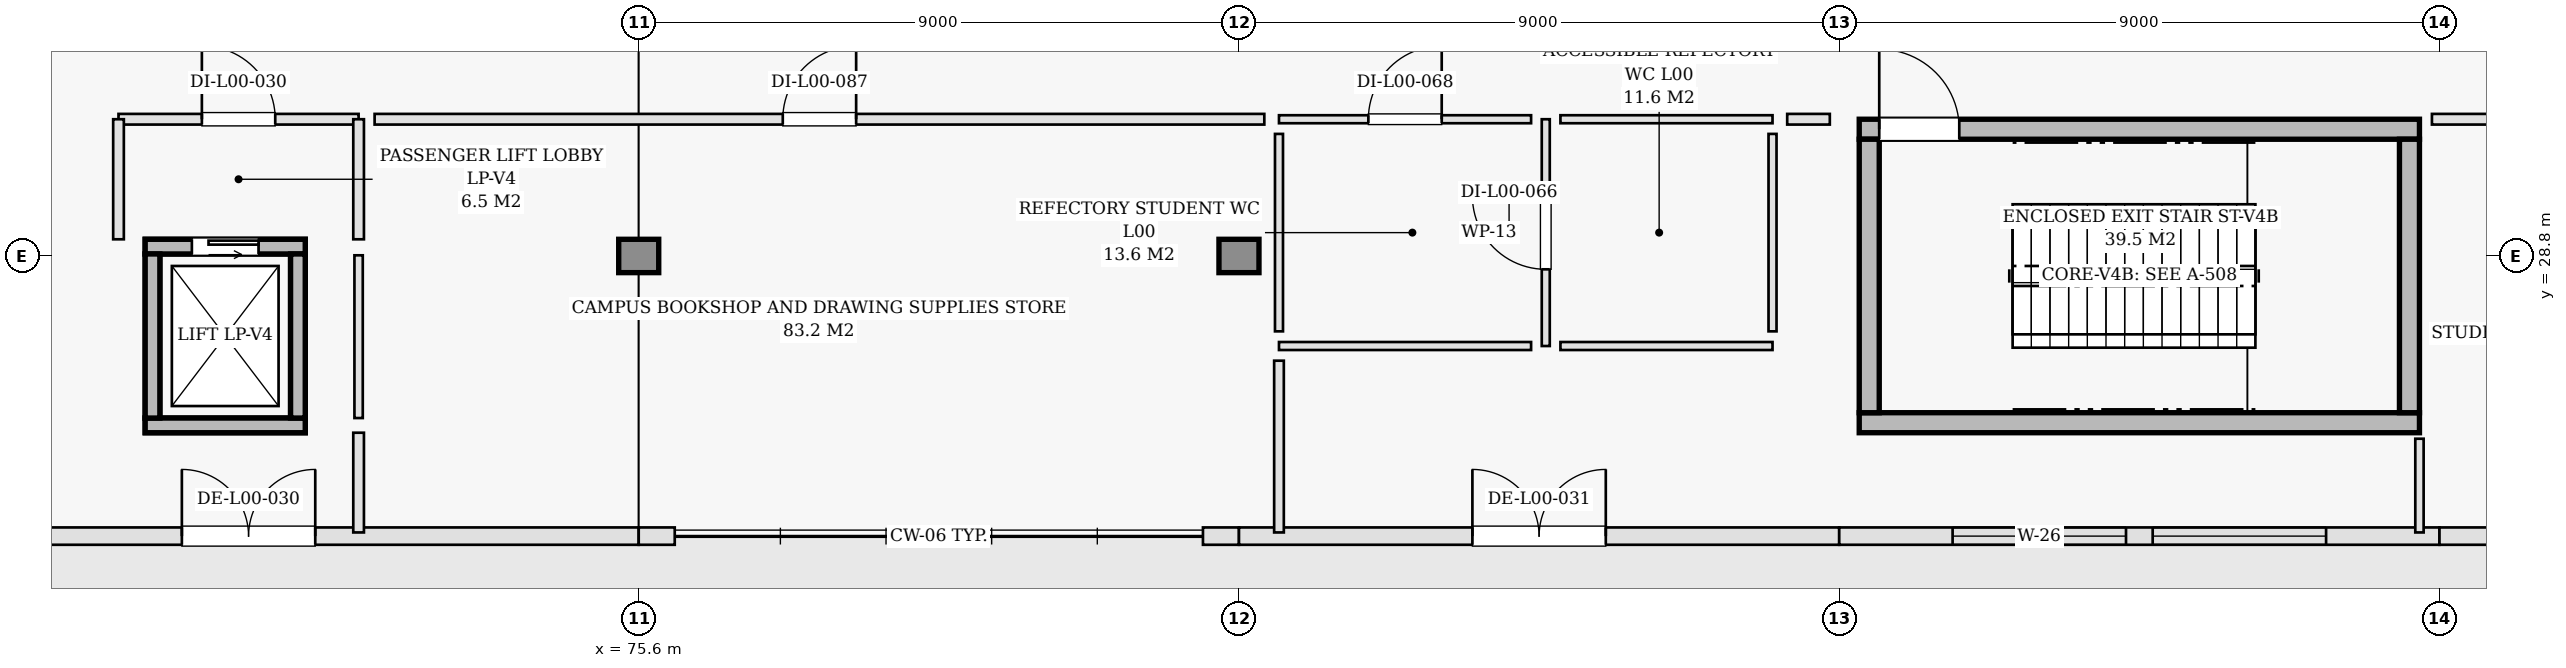
"""IFC4 building model, lengths in metres.
Left out: names, types, materials, properties, quantities, classifications, styles, units other than length and angle.
Written with IfcOpenShell. Run it as: python <this file> out.ifc"""

import sys

from ifc_helpers import new_model, si_unit, direction, frame, frame_2d, origin, origin_2d, place, context, subcontext, project, spatial, rectangle, extrude, element, fill, save


model = new_model("IFC4")
c1 = context("Model", 3, precision=1e-05, world=origin(), true_north=direction((0.0, 1.0)))
c2 = subcontext(c1, "Body", "Model", "MODEL_VIEW")
j1 = project(units=[si_unit("LENGTHUNIT", "METRE"), si_unit("PLANEANGLEUNIT", "RADIAN")], contexts=[c1])
p1 = place(None, origin())
s1 = spatial("IfcSite", under=j1, at=p1, CompositionType="ELEMENT")
p2 = place(p1, origin())
s2 = spatial("IfcBuilding", under=s1, at=p2, CompositionType="ELEMENT")
p3 = place(p2, origin())
s3 = spatial("IfcBuildingStorey", under=s2, at=p3, CompositionType="ELEMENT", Elevation=0.0)
for number, where, z_axis, x_axis in (
    (1, (75.6, 28.8, 0.0), (0.0, 0.0, 1.0), (1.0, 0.0, 0.0)),
    (2, (84.6, 28.8, 0.0), (0.0, 0.0, 1.0), (1.0, 0.0, 0.0)),
):
    element("IfcColumn", number, at=place(p3, frame(where, z_axis=z_axis, x_axis=x_axis)), inside=s3, PredefinedType="COLUMN", context=c2, shape_type="SweptSolid", body=[
        extrude(rectangle(XDim=0.5, YDim=0.5, at=origin_2d()), origin(), (0.0, 0.0, 1.0), 4.8),
    ])
p4 = place(p3, frame((66.6, 24.6, 0.0), z_axis=(0.0, 0.0, 1.0), x_axis=(1.0, 0.0, 0.0)))
e3 = element("IfcWall", 3, at=p4, inside=s3, PredefinedType="SOLIDWALL", context=c2, shape_type="SweptSolid", body=[
    extrude(rectangle(XDim=9.0, YDim=0.26, at=frame_2d((4.5, 0.0))), origin(), (0.0, 0.0, 1.0), 3.605),
])
p5 = place(p4, frame((2.15, 0.0, 0.0)))
e4 = element("IfcOpeningElement", 4, at=p5, cuts=e3, PredefinedType="OPENING", context=c2, shape_type="SweptSolid", body=[
    extrude(rectangle(XDim=2.0, YDim=2.3, at=frame_2d((1.0, 1.15))), frame((0.0, 0.14, 0.0), z_axis=(0.0, -1.0, 0.0), x_axis=(1.0, 0.0, 0.0)), (0.0, 0.0, 1.0), 0.28),
])
p6 = place(p3, frame((75.6, 24.6, 0.0), z_axis=(0.0, 0.0, 1.0), x_axis=(1.0, 0.0, 0.0)))
e5 = element("IfcWall", 5, at=p6, inside=s3, PredefinedType="SOLIDWALL", context=c2, shape_type="SweptSolid", body=[
    extrude(rectangle(XDim=0.54, YDim=0.26, at=frame_2d((0.27, 0.0))), origin(), (0.0, 0.0, 1.0), 3.955),
])
p7 = place(p3, frame((84.06, 24.6, 0.0), z_axis=(0.0, 0.0, 1.0), x_axis=(1.0, 0.0, 0.0)))
e6 = element("IfcWall", 6, at=p7, inside=s3, PredefinedType="SOLIDWALL", context=c2, shape_type="SweptSolid", body=[
    extrude(rectangle(XDim=0.54, YDim=0.26, at=frame_2d((0.27, 0.0))), origin(), (0.0, 0.0, 1.0), 3.955),
])
p8 = place(p3, frame((84.6, 24.6, 0.0), z_axis=(0.0, 0.0, 1.0), x_axis=(1.0, 0.0, 0.0)))
e7 = element("IfcWall", 7, at=p8, inside=s3, PredefinedType="SOLIDWALL", context=c2, shape_type="SweptSolid", body=[
    extrude(rectangle(XDim=9.0, YDim=0.26, at=frame_2d((4.5, 0.0))), origin(), (0.0, 0.0, 1.0), 3.605),
])
p9 = place(p8, frame((3.5, 0.0, 0.0)))
e8 = element("IfcOpeningElement", 8, at=p9, cuts=e7, PredefinedType="OPENING", context=c2, shape_type="SweptSolid", body=[
    extrude(rectangle(XDim=2.0, YDim=2.3, at=frame_2d((1.0, 1.15))), frame((0.0, 0.14, 0.0), z_axis=(0.0, -1.0, 0.0), x_axis=(1.0, 0.0, 0.0)), (0.0, 0.0, 1.0), 0.28),
])
p10 = place(p3, frame((93.6, 24.6, 0.0), z_axis=(0.0, 0.0, 1.0), x_axis=(1.0, 0.0, 0.0)))
e9 = element("IfcWall", 9, at=p10, inside=s3, PredefinedType="SOLIDWALL", context=c2, shape_type="SweptSolid", body=[
    extrude(rectangle(XDim=9.0, YDim=0.26, at=frame_2d((4.5, 0.0))), origin(), (0.0, 0.0, 1.0), 3.605),
])
p11 = place(p10, frame((1.7, 0.0, 0.9)))
e10 = element("IfcOpeningElement", 10, at=p11, cuts=e9, PredefinedType="OPENING", context=c2, shape_type="SweptSolid", body=[
    extrude(rectangle(XDim=2.6, YDim=1.95, at=frame_2d((1.3, 0.975))), frame((0.0, 0.14, 0.0), z_axis=(0.0, -1.0, 0.0), x_axis=(1.0, 0.0, 0.0)), (0.0, 0.0, 1.0), 0.28),
])
p12 = place(p10, frame((4.7, 0.0, 0.9)))
e11 = element("IfcOpeningElement", 11, at=p12, cuts=e9, PredefinedType="OPENING", context=c2, shape_type="SweptSolid", body=[
    extrude(rectangle(XDim=2.6, YDim=1.95, at=frame_2d((1.3, 0.975))), frame((0.0, 0.14, 0.0), z_axis=(0.0, -1.0, 0.0), x_axis=(1.0, 0.0, 0.0)), (0.0, 0.0, 1.0), 0.28),
])
p13 = place(p3, frame((102.6, 24.6, 0.0), z_axis=(0.0, 0.0, 1.0), x_axis=(1.0, 0.0, 0.0)))
e12 = element("IfcWall", 12, at=p13, inside=s3, PredefinedType="SOLIDWALL", context=c2, shape_type="SweptSolid", body=[
    extrude(rectangle(XDim=8.75, YDim=0.26, at=frame_2d((4.375, 0.0))), origin(), (0.0, 0.0, 1.0), 3.605),
])
p14 = place(p13, frame((3.375, 0.0, 0.0)))
e13 = element("IfcOpeningElement", 13, at=p14, cuts=e12, PredefinedType="OPENING", context=c2, shape_type="SweptSolid", body=[
    extrude(rectangle(XDim=2.0, YDim=2.3, at=frame_2d((1.0, 1.15))), frame((0.0, 0.14, 0.0), z_axis=(0.0, -1.0, 0.0), x_axis=(1.0, 0.0, 0.0)), (0.0, 0.0, 1.0), 0.28),
])
p15 = place(p3, frame((93.9, 26.3, 0.0), z_axis=(0.0, 0.0, 1.0), x_axis=(1.0, 0.0, 0.0)))
e14 = element("IfcWall", 14, at=p15, inside=s3, PredefinedType="SHEAR", context=c2, shape_type="SweptSolid", body=[
    extrude(rectangle(XDim=8.4, YDim=0.3, at=frame_2d((4.2, 0.0))), origin(), (0.0, 0.0, 1.0), 4.52),
])
p16 = place(p3, frame((93.9, 30.7, 0.0), z_axis=(0.0, 0.0, 1.0), x_axis=(1.0, 0.0, 0.0)))
e15 = element("IfcWall", 15, at=p16, inside=s3, PredefinedType="SHEAR", context=c2, shape_type="SweptSolid", body=[
    extrude(rectangle(XDim=8.4, YDim=0.3, at=frame_2d((4.2, 0.0))), origin(), (0.0, 0.0, 1.0), 4.52),
])
p17 = place(p16, frame((0.3, 0.0, 0.0)))
e16 = element("IfcOpeningElement", 16, at=p17, cuts=e15, PredefinedType="OPENING", context=c2, shape_type="SweptSolid", body=[
    extrude(rectangle(XDim=1.2, YDim=2.15, at=frame_2d((0.6, 1.075))), frame((0.0, 0.16, 0.0), z_axis=(0.0, -1.0, 0.0), x_axis=(1.0, 0.0, 0.0)), (0.0, 0.0, 1.0), 0.32),
])
for number, where, z_axis, x_axis in (
    (17, (94.05, 26.45, 0.0), (0.0, 0.0, 1.0), (0.0, 1.0, 0.0)),
    (18, (102.15, 26.45, 0.0), (0.0, 0.0, 1.0), (0.0, 1.0, 0.0)),
):
    element("IfcWall", number, at=place(p3, frame(where, z_axis=z_axis, x_axis=x_axis)), inside=s3, PredefinedType="SHEAR", context=c2, shape_type="SweptSolid", body=[
        extrude(rectangle(XDim=4.1, YDim=0.3, at=frame_2d((2.05, 0.0))), origin(), (0.0, 0.0, 1.0), 4.52),
    ])
for number, where, z_axis, x_axis in (
    (19, (68.2, 26.26, -1.4), (0.0, 0.0, 1.0), (1.0, 0.0, 0.0)),
    (20, (68.2, 28.94, -1.4), (0.0, 0.0, 1.0), (1.0, 0.0, 0.0)),
):
    element("IfcWall", number, at=place(p3, frame(where, z_axis=z_axis, x_axis=x_axis)), inside=s3, PredefinedType="SHEAR", context=c2, shape_type="SweptSolid", body=[
        extrude(rectangle(XDim=2.4, YDim=0.22, at=frame_2d((1.2, 0.0))), origin(), (0.0, 0.0, 1.0), 1.05),
    ])
for number, where, z_axis, x_axis in (
    (21, (68.31, 26.37, -1.4), (0.0, 0.0, 1.0), (0.0, 1.0, 0.0)),
    (22, (70.49, 26.37, -1.4), (0.0, 0.0, 1.0), (0.0, 1.0, 0.0)),
):
    element("IfcWall", number, at=place(p3, frame(where, z_axis=z_axis, x_axis=x_axis)), inside=s3, PredefinedType="SHEAR", context=c2, shape_type="SweptSolid", body=[
        extrude(rectangle(XDim=2.46, YDim=0.22, at=frame_2d((1.23, 0.0))), origin(), (0.0, 0.0, 1.0), 1.05),
    ])
p18 = place(p3, frame((68.2, 26.26, 0.0), z_axis=(0.0, 0.0, 1.0), x_axis=(1.0, 0.0, 0.0)))
e23 = element("IfcWall", 23, at=p18, inside=s3, PredefinedType="SHEAR", context=c2, shape_type="SweptSolid", body=[
    extrude(rectangle(XDim=2.4, YDim=0.22, at=frame_2d((1.2, 0.0))), origin(), (0.0, 0.0, 1.0), 4.52),
])
p19 = place(p3, frame((68.2, 28.94, 0.0), z_axis=(0.0, 0.0, 1.0), x_axis=(1.0, 0.0, 0.0)))
e24 = element("IfcWall", 24, at=p19, inside=s3, PredefinedType="SHEAR", context=c2, shape_type="SweptSolid", body=[
    extrude(rectangle(XDim=2.4, YDim=0.22, at=frame_2d((1.2, 0.0))), origin(), (0.0, 0.0, 1.0), 4.52),
])
p20 = place(p19, frame((0.7, 0.0, 0.0)))
e25 = element("IfcOpeningElement", 25, at=p20, cuts=e24, PredefinedType="OPENING", context=c2, shape_type="SweptSolid", body=[
    extrude(rectangle(XDim=1.0, YDim=2.15, at=frame_2d((0.5, 1.075))), frame((0.0, 0.12, 0.0), z_axis=(0.0, -1.0, 0.0), x_axis=(1.0, 0.0, 0.0)), (0.0, 0.0, 1.0), 0.24),
])
for number, where, z_axis, x_axis in (
    (26, (68.31, 26.37, 0.0), (0.0, 0.0, 1.0), (0.0, 1.0, 0.0)),
    (27, (70.49, 26.37, 0.0), (0.0, 0.0, 1.0), (0.0, 1.0, 0.0)),
):
    element("IfcWall", number, at=place(p3, frame(where, z_axis=z_axis, x_axis=x_axis)), inside=s3, PredefinedType="SHEAR", context=c2, shape_type="SweptSolid", body=[
        extrude(rectangle(XDim=2.46, YDim=0.22, at=frame_2d((1.23, 0.0))), origin(), (0.0, 0.0, 1.0), 4.52),
    ])
p21 = place(p3, frame((67.8, 30.85, 0.0), z_axis=(0.0, 0.0, 1.0), x_axis=(1.0, 0.0, 0.0)))
e28 = element("IfcWall", 28, at=p21, inside=s3, PredefinedType="PARTITIONING", context=c2, shape_type="SweptSolid", body=[
    extrude(rectangle(XDim=3.6, YDim=0.16, at=frame_2d((1.8, 0.0))), origin(), (0.0, 0.0, 1.0), 4.52),
])
p22 = place(p21, frame((1.25, 0.0, 0.0)))
e29 = element("IfcOpeningElement", 29, at=p22, cuts=e28, PredefinedType="OPENING", context=c2, shape_type="SweptSolid", body=[
    extrude(rectangle(XDim=1.1, YDim=2.15, at=frame_2d((0.55, 1.075))), frame((0.0, 0.09, 0.0), z_axis=(0.0, -1.0, 0.0), x_axis=(1.0, 0.0, 0.0)), (0.0, 0.0, 1.0), 0.18),
])
for number, where, z_axis, x_axis in (
    (30, (67.8, 29.05, 0.0), (0.0, 0.0, 1.0), (0.0, 1.0, 0.0)),
    (31, (71.4, 29.05, 0.0), (0.0, 0.0, 1.0), (0.0, 1.0, 0.0)),
):
    element("IfcWall", number, at=place(p3, frame(where, z_axis=z_axis, x_axis=x_axis)), inside=s3, PredefinedType="PARTITIONING", context=c2, shape_type="SweptSolid", body=[
        extrude(rectangle(XDim=1.8, YDim=0.16, at=frame_2d((0.9, 0.0))), origin(), (0.0, 0.0, 1.0), 4.52),
    ])
p23 = place(p3, frame((89.2, 27.45, 0.0), z_axis=(0.0, 0.0, 1.0), x_axis=(0.0, 1.0, 0.0)))
e32 = element("IfcWall", 32, at=p23, inside=s3, PredefinedType="PARTITIONING", context=c2, shape_type="SweptSolid", body=[
    extrude(rectangle(XDim=3.4, YDim=0.12, at=frame_2d((1.7, 0.0))), origin(), (0.0, 0.0, 1.0), 4.52),
])
p24 = place(p23, frame((1.15, 0.0, 0.0)))
e33 = element("IfcOpeningElement", 33, at=p24, cuts=e32, PredefinedType="OPENING", context=c2, shape_type="SweptSolid", body=[
    extrude(rectangle(XDim=1.1, YDim=2.15, at=frame_2d((0.55, 1.075))), frame((0.0, 0.07, 0.0), z_axis=(0.0, -1.0, 0.0), x_axis=(1.0, 0.0, 0.0)), (0.0, 0.0, 1.0), 0.14),
])
for number, where, z_axis, x_axis in (
    (34, (89.42, 27.45, 0.0), (0.0, 0.0, 1.0), (1.0, 0.0, 0.0)),
    (35, (89.42, 30.85, 0.0), (0.0, 0.0, 1.0), (1.0, 0.0, 0.0)),
):
    element("IfcWall", number, at=place(p3, frame(where, z_axis=z_axis, x_axis=x_axis)), inside=s3, PredefinedType="PARTITIONING", context=c2, shape_type="SweptSolid", body=[
        extrude(rectangle(XDim=3.18, YDim=0.12, at=frame_2d((1.59, 0.0))), origin(), (0.0, 0.0, 1.0), 4.52),
    ])
p25 = place(p3, frame((92.6, 27.67, 0.0), z_axis=(0.0, 0.0, 1.0), x_axis=(0.0, 1.0, 0.0)))
e36 = element("IfcWall", 36, at=p25, inside=s3, PredefinedType="PARTITIONING", context=c2, shape_type="SweptSolid", body=[
    extrude(rectangle(XDim=2.96, YDim=0.12, at=frame_2d((1.48, 0.0))), origin(), (0.0, 0.0, 1.0), 4.52),
])
p26 = place(p3, frame((85.2, 30.85, 0.0), z_axis=(0.0, 0.0, 1.0), x_axis=(1.0, 0.0, 0.0)))
e37 = element("IfcWall", 37, at=p26, inside=s3, PredefinedType="PARTITIONING", context=c2, shape_type="SweptSolid", body=[
    extrude(rectangle(XDim=3.78, YDim=0.12, at=frame_2d((1.89, 0.0))), origin(), (0.0, 0.0, 1.0), 4.52),
])
p27 = place(p26, frame((1.34, 0.0, 0.0)))
e38 = element("IfcOpeningElement", 38, at=p27, cuts=e37, PredefinedType="OPENING", context=c2, shape_type="SweptSolid", body=[
    extrude(rectangle(XDim=1.1, YDim=2.15, at=frame_2d((0.55, 1.075))), frame((0.0, 0.07, 0.0), z_axis=(0.0, -1.0, 0.0), x_axis=(1.0, 0.0, 0.0)), (0.0, 0.0, 1.0), 0.14),
])
p28 = place(p3, frame((85.2, 27.45, 0.0), z_axis=(0.0, 0.0, 1.0), x_axis=(1.0, 0.0, 0.0)))
e39 = element("IfcWall", 39, at=p28, inside=s3, PredefinedType="PARTITIONING", context=c2, shape_type="SweptSolid", body=[
    extrude(rectangle(XDim=3.78, YDim=0.12, at=frame_2d((1.89, 0.0))), origin(), (0.0, 0.0, 1.0), 4.52),
])
p29 = place(p3, frame((85.2, 27.67, 0.0), z_axis=(0.0, 0.0, 1.0), x_axis=(0.0, 1.0, 0.0)))
e40 = element("IfcWall", 40, at=p29, inside=s3, PredefinedType="PARTITIONING", context=c2, shape_type="SweptSolid", body=[
    extrude(rectangle(XDim=2.96, YDim=0.12, at=frame_2d((1.48, 0.0))), origin(), (0.0, 0.0, 1.0), 4.52),
])
p30 = place(p3, frame((102.487, 30.85, 0.0), z_axis=(0.0, 0.0, 1.0), x_axis=(1.0, 0.0, 0.0)))
e41 = element("IfcWall", 41, at=p30, inside=s3, PredefinedType="PARTITIONING", context=c2, shape_type="SweptSolid", body=[
    extrude(rectangle(XDim=2.967, YDim=0.16, at=frame_2d((1.483, 0.0))), origin(), (0.0, 0.0, 1.0), 3.605),
])
p31 = place(p3, frame((102.3, 24.655, 0.0), z_axis=(0.0, 0.0, 1.0), x_axis=(0.0, 1.0, 0.0)))
e42 = element("IfcWall", 42, at=p31, inside=s3, PredefinedType="PARTITIONING", context=c2, shape_type="SweptSolid", body=[
    extrude(rectangle(XDim=1.405, YDim=0.125, at=frame_2d((0.703, 0.0))), origin(), (0.0, 0.0, 1.0), 3.605),
])
p32 = place(p3, frame((71.64, 30.85, 0.0), z_axis=(0.0, 0.0, 1.0), x_axis=(1.0, 0.0, 0.0)))
e43 = element("IfcWall", 43, at=p32, inside=s3, PredefinedType="PARTITIONING", context=c2, shape_type="SweptSolid", body=[
    extrude(rectangle(XDim=13.34, YDim=0.16, at=frame_2d((6.67, 0.0))), origin(), (0.0, 0.0, 1.0), 3.605),
])
p33 = place(p32, frame((6.12, 0.0, 0.0)))
e44 = element("IfcOpeningElement", 44, at=p33, cuts=e43, PredefinedType="OPENING", context=c2, shape_type="SweptSolid", body=[
    extrude(rectangle(XDim=1.1, YDim=2.15, at=frame_2d((0.55, 1.075))), frame((0.0, 0.09, 0.0), z_axis=(0.0, -1.0, 0.0), x_axis=(1.0, 0.0, 0.0)), (0.0, 0.0, 1.0), 0.18),
])
p34 = place(p3, frame((71.4, 24.655, 0.0), z_axis=(0.0, 0.0, 1.0), x_axis=(0.0, 1.0, 0.0)))
e45 = element("IfcWall", 45, at=p34, inside=s3, PredefinedType="PARTITIONING", context=c2, shape_type="SweptSolid", body=[
    extrude(rectangle(XDim=1.495, YDim=0.16, at=frame_2d((0.748, 0.0))), origin(), (0.0, 0.0, 1.0), 4.52),
])
p35 = place(p3, frame((71.4, 26.37, 0.0), z_axis=(0.0, 0.0, 1.0), x_axis=(0.0, 1.0, 0.0)))
e46 = element("IfcWall", 46, at=p35, inside=s3, PredefinedType="PARTITIONING", context=c2, shape_type="SweptSolid", body=[
    extrude(rectangle(XDim=2.44, YDim=0.125, at=frame_2d((1.22, 0.0))), origin(), (0.0, 0.0, 1.0), 4.52),
])
p36 = place(p3, frame((85.2, 24.655, 0.0), z_axis=(0.0, 0.0, 1.0), x_axis=(0.0, 1.0, 0.0)))
e47 = element("IfcWall", 47, at=p36, inside=s3, PredefinedType="PARTITIONING", context=c2, shape_type="SweptSolid", body=[
    extrude(rectangle(XDim=2.575, YDim=0.145, at=frame_2d((1.288, 0.0))), origin(), (0.0, 0.0, 1.0), 4.145),
])
p37 = place(p3, frame((92.82, 30.85, 0.0), z_axis=(0.0, 0.0, 1.0), x_axis=(1.0, 0.0, 0.0)))
e48 = element("IfcWall", 48, at=p37, inside=s3, PredefinedType="PARTITIONING", context=c2, shape_type="SweptSolid", body=[
    extrude(rectangle(XDim=0.639, YDim=0.16, at=frame_2d((0.319, 0.0))), origin(), (0.0, 0.0, 1.0), 3.605),
])
p38 = place(p5, origin())
e49 = element("IfcDoor", 49, at=p38, inside=s3, OperationType="DOUBLE_DOOR_SINGLE_SWING", PredefinedType="DOOR", context=c2, shape_type="SweptSolid", body=[
    extrude(rectangle(XDim=2.0, YDim=2.3, at=frame_2d((1.0, 1.15))), frame((0.0, 0.025, 0.0), z_axis=(0.0, -1.0, 0.0), x_axis=(1.0, 0.0, 0.0)), (0.0, 0.0, 1.0), 0.05),
])
fill(e4, e49)
p39 = place(p9, origin())
e50 = element("IfcDoor", 50, at=p39, inside=s3, OperationType="DOUBLE_DOOR_SINGLE_SWING", PredefinedType="DOOR", context=c2, shape_type="SweptSolid", body=[
    extrude(rectangle(XDim=2.0, YDim=2.3, at=frame_2d((1.0, 1.15))), frame((0.0, 0.025, 0.0), z_axis=(0.0, -1.0, 0.0), x_axis=(1.0, 0.0, 0.0)), (0.0, 0.0, 1.0), 0.05),
])
fill(e8, e50)
p40 = place(p11, origin())
e51 = element("IfcWindow", 51, at=p40, inside=s3, PartitioningType="DOUBLE_PANEL_VERTICAL", PredefinedType="WINDOW", context=c2, shape_type="SweptSolid", body=[
    extrude(rectangle(XDim=2.6, YDim=1.95, at=frame_2d((1.3, 0.975))), frame((0.0, 0.03, 0.0), z_axis=(0.0, -1.0, 0.0), x_axis=(1.0, 0.0, 0.0)), (0.0, 0.0, 1.0), 0.06),
])
fill(e10, e51)
p41 = place(p12, origin())
e52 = element("IfcWindow", 52, at=p41, inside=s3, PartitioningType="DOUBLE_PANEL_VERTICAL", PredefinedType="WINDOW", context=c2, shape_type="SweptSolid", body=[
    extrude(rectangle(XDim=2.6, YDim=1.95, at=frame_2d((1.3, 0.975))), frame((0.0, 0.03, 0.0), z_axis=(0.0, -1.0, 0.0), x_axis=(1.0, 0.0, 0.0)), (0.0, 0.0, 1.0), 0.06),
])
fill(e11, e52)
p42 = place(p17, origin())
e53 = element("IfcDoor", 53, at=p42, inside=s3, OperationType="SINGLE_SWING_LEFT", PredefinedType="DOOR", context=c2, shape_type="SweptSolid", body=[
    extrude(rectangle(XDim=1.2, YDim=2.15, at=frame_2d((0.6, 1.075))), frame((0.0, 0.025, 0.0), z_axis=(0.0, -1.0, 0.0), x_axis=(1.0, 0.0, 0.0)), (0.0, 0.0, 1.0), 0.05),
])
fill(e16, e53)
p43 = place(p20, origin())
e54 = element("IfcDoor", 54, at=p43, inside=s3, OperationType="SLIDING_TO_RIGHT", PredefinedType="DOOR", context=c2, shape_type="SweptSolid", body=[
    extrude(rectangle(XDim=1.0, YDim=2.15, at=frame_2d((0.5, 1.075))), frame((0.0, 0.025, 0.0), z_axis=(0.0, -1.0, 0.0), x_axis=(1.0, 0.0, 0.0)), (0.0, 0.0, 1.0), 0.05),
])
fill(e25, e54)
p44 = place(p22, origin())
e55 = element("IfcDoor", 55, at=p44, inside=s3, OperationType="SINGLE_SWING_LEFT", PredefinedType="DOOR", context=c2, shape_type="SweptSolid", body=[
    extrude(rectangle(XDim=1.1, YDim=2.15, at=frame_2d((0.55, 1.075))), frame((0.0, 0.025, 0.0), z_axis=(0.0, -1.0, 0.0), x_axis=(1.0, 0.0, 0.0)), (0.0, 0.0, 1.0), 0.05),
])
fill(e29, e55)
p45 = place(p24, origin())
e56 = element("IfcDoor", 56, at=p45, inside=s3, OperationType="SINGLE_SWING_RIGHT", PredefinedType="DOOR", context=c2, shape_type="SweptSolid", body=[
    extrude(rectangle(XDim=1.1, YDim=2.15, at=frame_2d((0.55, 1.075))), frame((0.0, 0.025, 0.0), z_axis=(0.0, -1.0, 0.0), x_axis=(1.0, 0.0, 0.0)), (0.0, 0.0, 1.0), 0.05),
])
fill(e33, e56)
p46 = place(p27, origin())
e57 = element("IfcDoor", 57, at=p46, inside=s3, OperationType="SINGLE_SWING_RIGHT", PredefinedType="DOOR", context=c2, shape_type="SweptSolid", body=[
    extrude(rectangle(XDim=1.1, YDim=2.15, at=frame_2d((0.55, 1.075))), frame((0.0, 0.025, 0.0), z_axis=(0.0, -1.0, 0.0), x_axis=(1.0, 0.0, 0.0)), (0.0, 0.0, 1.0), 0.05),
])
fill(e38, e57)
p47 = place(p33, origin())
e58 = element("IfcDoor", 58, at=p47, inside=s3, OperationType="SINGLE_SWING_RIGHT", PredefinedType="DOOR", context=c2, shape_type="SweptSolid", body=[
    extrude(rectangle(XDim=1.1, YDim=2.15, at=frame_2d((0.55, 1.075))), frame((0.0, 0.025, 0.0), z_axis=(0.0, -1.0, 0.0), x_axis=(1.0, 0.0, 0.0)), (0.0, 0.0, 1.0), 0.05),
])
fill(e44, e58)
save(model, sys.argv[1])
